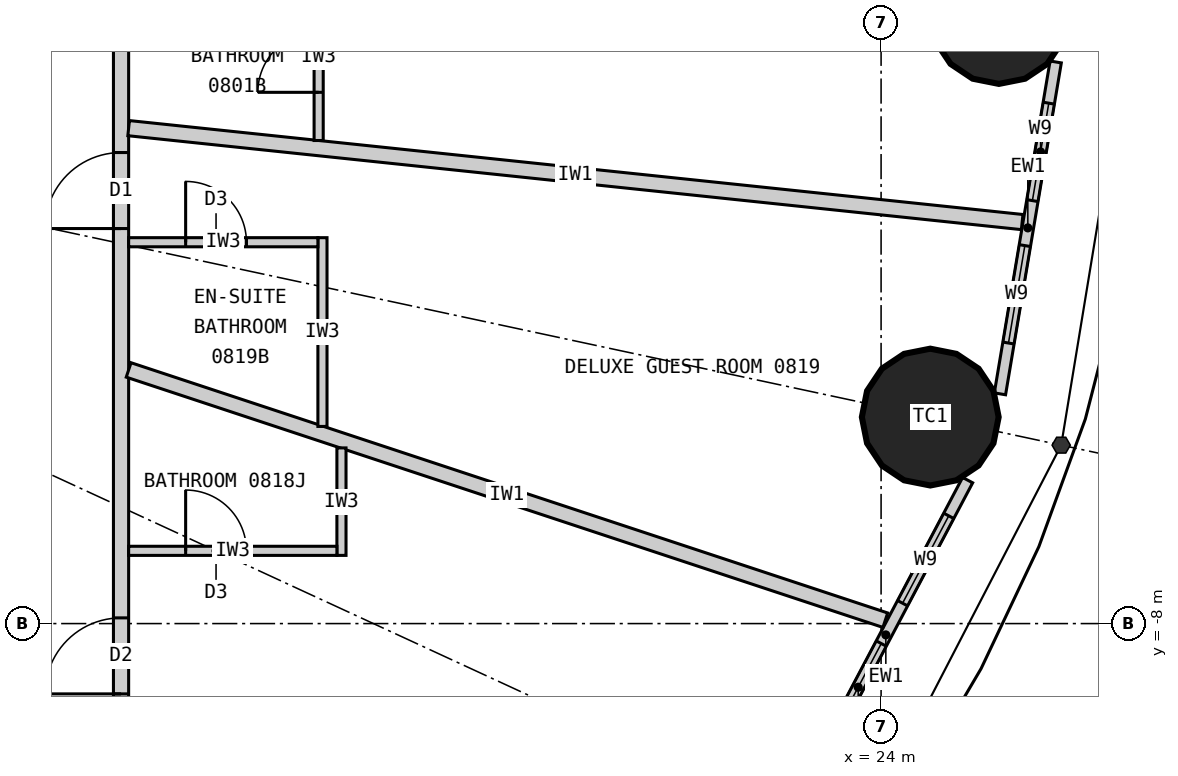
"""IFC4 building model, lengths in metres.
Left out: names, types, materials, properties, quantities, classifications, styles, units other than length and angle.
Written with IfcOpenShell. Run it as: python <this file> out.ifc"""

import sys

from ifc_helpers import new_model, si_unit, direction, frame, frame_2d, origin, origin_2d, place, context, subcontext, project, spatial, rectangle, circle, extrude, element, fill, save


model = new_model("IFC4")
c1 = context("Model", 3, precision=1e-05, world=origin(), true_north=direction((0.0, 1.0)))
c2 = subcontext(c1, "Body", "Model", "MODEL_VIEW")
j1 = project(units=[si_unit("LENGTHUNIT", "METRE"), si_unit("PLANEANGLEUNIT", "RADIAN")], contexts=[c1])
p1 = place(None, origin())
s1 = spatial("IfcSite", under=j1, at=p1, CompositionType="ELEMENT")
p2 = place(p1, origin())
s2 = spatial("IfcBuilding", under=s1, at=p2, CompositionType="ELEMENT")
p3 = place(p2, frame((0.0, 0.0, 39.3)))
s3 = spatial("IfcBuildingStorey", under=s2, at=p3, CompositionType="ELEMENT", Elevation=39.3)
for number, where, z_axis, x_axis in (
    (1, (25.55, 0.0, 0.0), (0.0, 0.0, 1.0), (1.0, 0.0, 0.0)),
    (2, (24.647, -5.283, 0.0), (0.0, 0.0, 1.0), (1.0, 0.0, 0.0)),
):
    element("IfcColumn", number, at=place(p3, frame(where, z_axis=z_axis, x_axis=x_axis)), inside=s3, PredefinedType="COLUMN", context=c2, shape_type="SweptSolid", body=[
        extrude(circle(Radius=0.9, at=origin_2d()), origin(), (0.0, 0.0, 1.0), 3.3),
    ])
p4 = place(p3, frame((22.986, -10.185, 0.0), z_axis=(0.0, 0.0, 1.0), x_axis=(0.467303182954, 0.884097129959, 0.0)))
e3 = element("IfcWall", 3, at=p4, inside=s3, PredefinedType="ELEMENTEDWALL", context=c2, shape_type="SweptSolid", body=[
    extrude(rectangle(XDim=4.606, YDim=0.15, at=frame_2d((2.303, 0.0))), origin(), (0.0, 0.0, 1.0), 3.12),
])
p5 = place(p4, frame((0.875, 0.0, 0.9)))
e4 = element("IfcOpeningElement", 4, at=p5, cuts=e3, PredefinedType="OPENING", context=c2, shape_type="SweptSolid", body=[
    extrude(rectangle(XDim=1.3, YDim=1.9, at=frame_2d((0.65, 0.95))), frame((0.0, 0.085, 0.0), z_axis=(0.0, -1.0, 0.0), x_axis=(1.0, 0.0, 0.0)), (0.0, 0.0, 1.0), 0.17),
])
p6 = place(p4, frame((2.775, 0.0, 0.9)))
e5 = element("IfcOpeningElement", 5, at=p6, cuts=e3, PredefinedType="OPENING", context=c2, shape_type="SweptSolid", body=[
    extrude(rectangle(XDim=1.3, YDim=1.9, at=frame_2d((0.65, 0.95))), frame((0.0, 0.085, 0.0), z_axis=(0.0, -1.0, 0.0), x_axis=(1.0, 0.0, 0.0)), (0.0, 0.0, 1.0), 0.17),
])
p7 = place(p3, frame((25.564, -4.978, 0.0), z_axis=(0.0, 0.0, 1.0), x_axis=(0.165641751141, 0.986185991727, 0.0)))
e6 = element("IfcWall", 6, at=p7, inside=s3, PredefinedType="ELEMENTEDWALL", context=c2, shape_type="SweptSolid", body=[
    extrude(rectangle(XDim=4.428, YDim=0.15, at=frame_2d((2.214, 0.0))), origin(), (0.0, 0.0, 1.0), 3.12),
])
p8 = place(p7, frame((0.678, 0.0, 0.9)))
e7 = element("IfcOpeningElement", 7, at=p8, cuts=e6, PredefinedType="OPENING", context=c2, shape_type="SweptSolid", body=[
    extrude(rectangle(XDim=1.3, YDim=1.9, at=frame_2d((0.65, 0.95))), frame((0.0, 0.085, 0.0), z_axis=(0.0, -1.0, 0.0), x_axis=(1.0, 0.0, 0.0)), (0.0, 0.0, 1.0), 0.17),
])
p9 = place(p7, frame((2.578, 0.0, 0.9)))
e8 = element("IfcOpeningElement", 8, at=p9, cuts=e6, PredefinedType="OPENING", context=c2, shape_type="SweptSolid", body=[
    extrude(rectangle(XDim=1.3, YDim=1.9, at=frame_2d((0.65, 0.95))), frame((0.0, 0.085, 0.0), z_axis=(0.0, -1.0, 0.0), x_axis=(1.0, 0.0, 0.0)), (0.0, 0.0, 1.0), 0.17),
])
p10 = place(p3, frame((14.0, -9.9, 0.0), z_axis=(0.0, 0.0, 1.0), x_axis=(0.0, 1.0, 0.0)))
e9 = element("IfcWall", 9, at=p10, inside=s3, PredefinedType="PARTITIONING", context=c2, shape_type="SweptSolid", body=[
    extrude(rectangle(XDim=19.8, YDim=0.2, at=frame_2d((9.9, 0.0))), origin(), (0.0, 0.0, 1.0), 3.12),
])
p11 = place(p10, frame((11.698, 0.0, 0.0)))
e10 = element("IfcOpeningElement", 10, at=p11, cuts=e9, PredefinedType="OPENING", context=c2, shape_type="SweptSolid", body=[
    extrude(rectangle(XDim=1.0, YDim=2.2, at=frame_2d((0.5, 1.1))), frame((0.0, 0.11, 0.0), z_axis=(0.0, -1.0, 0.0), x_axis=(1.0, 0.0, 0.0)), (0.0, 0.0, 1.0), 0.22),
])
p12 = place(p10, frame((13.554, 0.0, 0.0)))
e11 = element("IfcOpeningElement", 11, at=p12, cuts=e9, PredefinedType="OPENING", context=c2, shape_type="SweptSolid", body=[
    extrude(rectangle(XDim=1.0, YDim=2.0, at=frame_2d((0.5, 1.0))), frame((0.0, 0.11, 0.0), z_axis=(0.0, -1.0, 0.0), x_axis=(1.0, 0.0, 0.0)), (0.0, 0.0, 1.0), 0.22),
])
p13 = place(p10, frame((18.698, 0.0, 0.0)))
e12 = element("IfcOpeningElement", 12, at=p13, cuts=e9, PredefinedType="OPENING", context=c2, shape_type="SweptSolid", body=[
    extrude(rectangle(XDim=1.0, YDim=2.2, at=frame_2d((0.5, 1.1))), frame((0.0, 0.11, 0.0), z_axis=(0.0, -1.0, 0.0), x_axis=(1.0, 0.0, 0.0)), (0.0, 0.0, 1.0), 0.22),
])
p14 = place(p10, frame((0.975, 0.0, 0.0)))
e13 = element("IfcOpeningElement", 13, at=p14, cuts=e9, PredefinedType="OPENING", context=c2, shape_type="SweptSolid", body=[
    extrude(rectangle(XDim=1.0, YDim=2.2, at=frame_2d((0.5, 1.1))), frame((0.0, 0.11, 0.0), z_axis=(0.0, -1.0, 0.0), x_axis=(1.0, 0.0, 0.0)), (0.0, 0.0, 1.0), 0.22),
])
p15 = place(p10, frame((7.097, 0.0, 0.0)))
e14 = element("IfcOpeningElement", 14, at=p15, cuts=e9, PredefinedType="OPENING", context=c2, shape_type="SweptSolid", body=[
    extrude(rectangle(XDim=1.0, YDim=2.2, at=frame_2d((0.5, 1.1))), frame((0.0, 0.11, 0.0), z_axis=(0.0, -1.0, 0.0), x_axis=(1.0, 0.0, 0.0)), (0.0, 0.0, 1.0), 0.22),
])
p16 = place(p3, frame((14.1, -4.663, 0.0), z_axis=(0.0, 0.0, 1.0), x_axis=(0.949432655039, -0.31397075269, 0.0)))
e15 = element("IfcWall", 15, at=p16, inside=s3, PredefinedType="PARTITIONING", context=c2, shape_type="SweptSolid", body=[
    extrude(rectangle(XDim=10.486, YDim=0.2, at=frame_2d((5.243, 0.0))), origin(), (0.0, 0.0, 1.0), 3.12),
])
p17 = place(p3, frame((14.1, -1.482, 0.0), z_axis=(0.0, 0.0, 1.0), x_axis=(0.994522076235, -0.104526742422, 0.0)))
e16 = element("IfcWall", 16, at=p17, inside=s3, PredefinedType="PARTITIONING", context=c2, shape_type="SweptSolid", body=[
    extrude(rectangle(XDim=11.821, YDim=0.2, at=frame_2d((5.91, 0.0))), origin(), (0.0, 0.0, 1.0), 2.32),
])
p18 = place(p3, frame((16.6, -1.645, 0.0), z_axis=(0.0, 0.0, 1.0), x_axis=(0.0, 1.0, 0.0)))
e17 = element("IfcWall", 17, at=p18, inside=s3, PredefinedType="PARTITIONING", context=c2, shape_type="SweptSolid", body=[
    extrude(rectangle(XDim=2.203, YDim=0.12, at=frame_2d((1.102, 0.0))), origin(), (0.0, 0.0, 1.0), 3.12),
])
p19 = place(p18, frame((0.634, 0.0, 0.0)))
e18 = element("IfcOpeningElement", 18, at=p19, cuts=e17, PredefinedType="OPENING", context=c2, shape_type="SweptSolid", body=[
    extrude(rectangle(XDim=0.8, YDim=2.1, at=frame_2d((0.4, 1.05))), frame((0.0, 0.07, 0.0), z_axis=(0.0, -1.0, 0.0), x_axis=(1.0, 0.0, 0.0)), (0.0, 0.0, 1.0), 0.14),
])
p20 = place(p3, frame((16.9, -5.689, 0.0), z_axis=(0.0, 0.0, 1.0), x_axis=(0.0, -1.0, 0.0)))
e19 = element("IfcWall", 19, at=p20, inside=s3, PredefinedType="PARTITIONING", context=c2, shape_type="SweptSolid", body=[
    extrude(rectangle(XDim=1.414, YDim=0.12, at=frame_2d((0.707, 0.0))), origin(), (0.0, 0.0, 1.0), 3.12),
])
p21 = place(p3, frame((14.1, -7.043, 0.0), z_axis=(0.0, 0.0, 1.0), x_axis=(1.0, 0.0, 0.0)))
e20 = element("IfcWall", 20, at=p21, inside=s3, PredefinedType="PARTITIONING", context=c2, shape_type="SweptSolid", body=[
    extrude(rectangle(XDim=2.74, YDim=0.12, at=frame_2d((1.37, 0.0))), origin(), (0.0, 0.0, 1.0), 3.12),
])
p22 = place(p21, frame((0.75, 0.0, 0.0)))
e21 = element("IfcOpeningElement", 21, at=p22, cuts=e20, PredefinedType="OPENING", context=c2, shape_type="SweptSolid", body=[
    extrude(rectangle(XDim=0.8, YDim=2.1, at=frame_2d((0.4, 1.05))), frame((0.0, 0.07, 0.0), z_axis=(0.0, -1.0, 0.0), x_axis=(1.0, 0.0, 0.0)), (0.0, 0.0, 1.0), 0.14),
])
p23 = place(p3, frame((16.65, -5.406, 0.0), z_axis=(0.0, 0.0, 1.0), x_axis=(0.0, 1.0, 0.0)))
e22 = element("IfcWall", 22, at=p23, inside=s3, PredefinedType="PARTITIONING", context=c2, shape_type="SweptSolid", body=[
    extrude(rectangle(XDim=2.483, YDim=0.12, at=frame_2d((1.242, 0.0))), origin(), (0.0, 0.0, 1.0), 3.12),
])
p24 = place(p3, frame((14.1, -2.983, 0.0), z_axis=(0.0, 0.0, 1.0), x_axis=(1.0, 0.0, 0.0)))
e23 = element("IfcWall", 23, at=p24, inside=s3, PredefinedType="PARTITIONING", context=c2, shape_type="SweptSolid", body=[
    extrude(rectangle(XDim=2.49, YDim=0.12, at=frame_2d((1.245, 0.0))), origin(), (0.0, 0.0, 1.0), 3.12),
])
p25 = place(p24, frame((0.75, 0.0, 0.0)))
e24 = element("IfcOpeningElement", 24, at=p25, cuts=e23, PredefinedType="OPENING", context=c2, shape_type="SweptSolid", body=[
    extrude(rectangle(XDim=0.8, YDim=2.1, at=frame_2d((0.4, 1.05))), frame((0.0, 0.07, 0.0), z_axis=(0.0, -1.0, 0.0), x_axis=(1.0, 0.0, 0.0)), (0.0, 0.0, 1.0), 0.14),
])
p26 = place(p5, origin())
e25 = element("IfcWindow", 25, at=p26, inside=s3, PartitioningType="SINGLE_PANEL", PredefinedType="WINDOW", context=c2, shape_type="SweptSolid", body=[
    extrude(rectangle(XDim=1.3, YDim=1.9, at=frame_2d((0.65, 0.95))), frame((0.0, 0.03, 0.0), z_axis=(0.0, -1.0, 0.0), x_axis=(1.0, 0.0, 0.0)), (0.0, 0.0, 1.0), 0.06),
])
fill(e4, e25)
p27 = place(p6, origin())
e26 = element("IfcWindow", 26, at=p27, inside=s3, PartitioningType="SINGLE_PANEL", PredefinedType="WINDOW", context=c2, shape_type="SweptSolid", body=[
    extrude(rectangle(XDim=1.3, YDim=1.9, at=frame_2d((0.65, 0.95))), frame((0.0, 0.03, 0.0), z_axis=(0.0, -1.0, 0.0), x_axis=(1.0, 0.0, 0.0)), (0.0, 0.0, 1.0), 0.06),
])
fill(e5, e26)
p28 = place(p8, origin())
e27 = element("IfcWindow", 27, at=p28, inside=s3, PartitioningType="SINGLE_PANEL", PredefinedType="WINDOW", context=c2, shape_type="SweptSolid", body=[
    extrude(rectangle(XDim=1.3, YDim=1.9, at=frame_2d((0.65, 0.95))), frame((0.0, 0.03, 0.0), z_axis=(0.0, -1.0, 0.0), x_axis=(1.0, 0.0, 0.0)), (0.0, 0.0, 1.0), 0.06),
])
fill(e7, e27)
p29 = place(p9, origin())
e28 = element("IfcWindow", 28, at=p29, inside=s3, PartitioningType="SINGLE_PANEL", PredefinedType="WINDOW", context=c2, shape_type="SweptSolid", body=[
    extrude(rectangle(XDim=1.3, YDim=1.9, at=frame_2d((0.65, 0.95))), frame((0.0, 0.03, 0.0), z_axis=(0.0, -1.0, 0.0), x_axis=(1.0, 0.0, 0.0)), (0.0, 0.0, 1.0), 0.06),
])
fill(e8, e28)
p30 = place(p19, origin())
e29 = element("IfcDoor", 29, at=p30, inside=s3, OperationType="SINGLE_SWING_LEFT", PredefinedType="DOOR", context=c2, shape_type="SweptSolid", body=[
    extrude(rectangle(XDim=0.8, YDim=2.1, at=frame_2d((0.4, 1.05))), frame((0.0, 0.025, 0.0), z_axis=(0.0, -1.0, 0.0), x_axis=(1.0, 0.0, 0.0)), (0.0, 0.0, 1.0), 0.05),
])
fill(e18, e29)
p31 = place(p22, origin())
e30 = element("IfcDoor", 30, at=p31, inside=s3, OperationType="SINGLE_SWING_LEFT", PredefinedType="DOOR", context=c2, shape_type="SweptSolid", body=[
    extrude(rectangle(XDim=0.8, YDim=2.1, at=frame_2d((0.4, 1.05))), frame((0.0, 0.025, 0.0), z_axis=(0.0, -1.0, 0.0), x_axis=(1.0, 0.0, 0.0)), (0.0, 0.0, 1.0), 0.05),
])
fill(e21, e30)
p32 = place(p14, origin())
e31 = element("IfcDoor", 31, at=p32, inside=s3, OperationType="SINGLE_SWING_LEFT", PredefinedType="DOOR", context=c2, shape_type="SweptSolid", body=[
    extrude(rectangle(XDim=1.0, YDim=2.2, at=frame_2d((0.5, 1.1))), frame((0.0, 0.025, 0.0), z_axis=(0.0, -1.0, 0.0), x_axis=(1.0, 0.0, 0.0)), (0.0, 0.0, 1.0), 0.05),
])
fill(e13, e31)
p33 = place(p25, origin())
e32 = element("IfcDoor", 32, at=p33, inside=s3, OperationType="SINGLE_SWING_LEFT", PredefinedType="DOOR", context=c2, shape_type="SweptSolid", body=[
    extrude(rectangle(XDim=0.8, YDim=2.1, at=frame_2d((0.4, 1.05))), frame((0.0, 0.025, 0.0), z_axis=(0.0, -1.0, 0.0), x_axis=(1.0, 0.0, 0.0)), (0.0, 0.0, 1.0), 0.05),
])
fill(e24, e32)
p34 = place(p15, origin())
e33 = element("IfcDoor", 33, at=p34, inside=s3, OperationType="SINGLE_SWING_LEFT", PredefinedType="DOOR", context=c2, shape_type="SweptSolid", body=[
    extrude(rectangle(XDim=1.0, YDim=2.2, at=frame_2d((0.5, 1.1))), frame((0.0, 0.025, 0.0), z_axis=(0.0, -1.0, 0.0), x_axis=(1.0, 0.0, 0.0)), (0.0, 0.0, 1.0), 0.05),
])
fill(e14, e33)
save(model, sys.argv[1])
